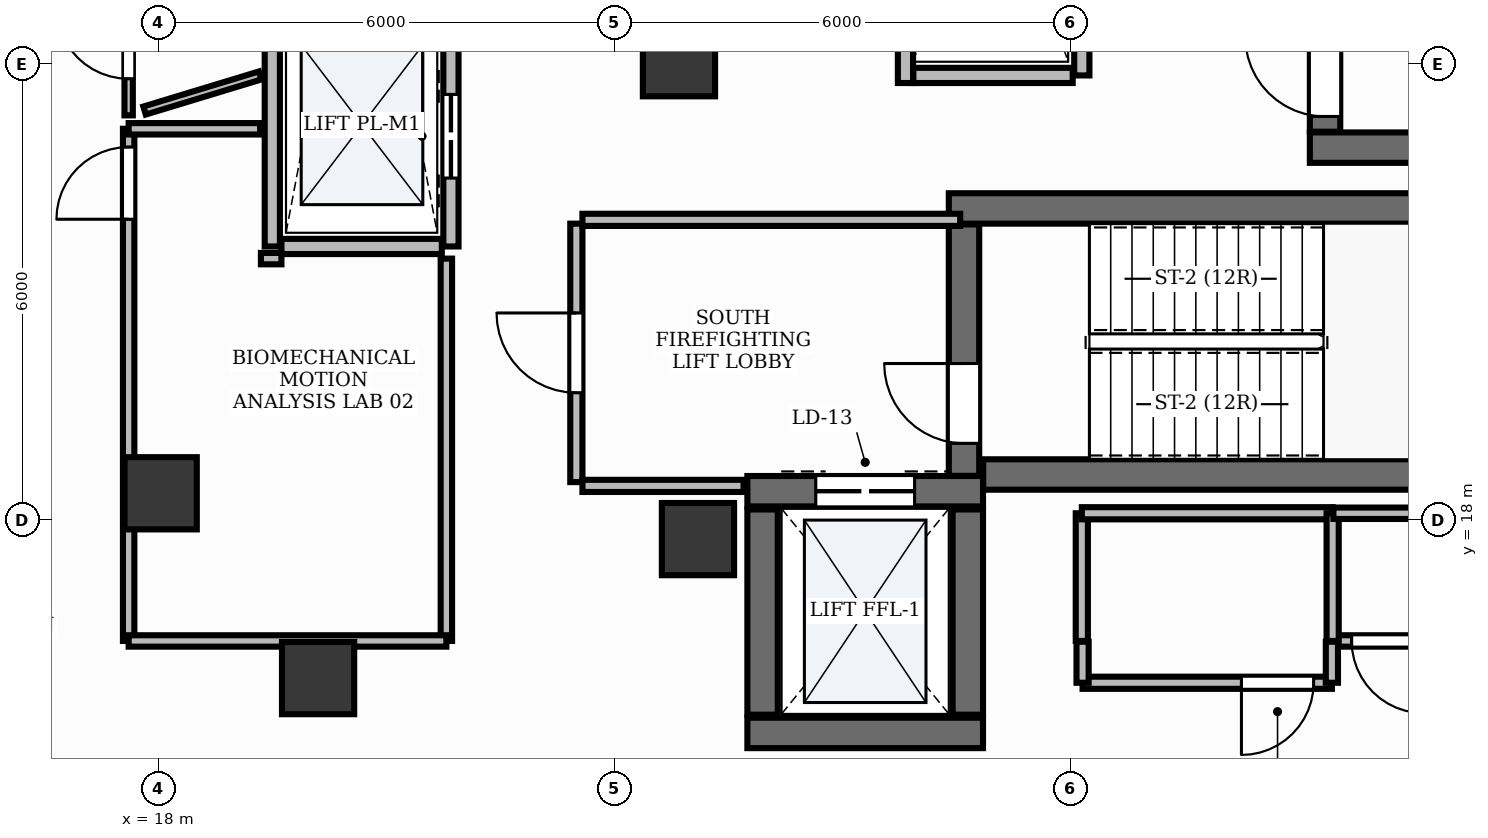
"""IFC4 building model, lengths in metres.
Left out: names, types, materials, properties, quantities, classifications, styles, units other than length and angle.
Written with IfcOpenShell. Run it as: python <this file> out.ifc"""

import sys

from ifc_helpers import new_model, si_unit, direction, frame, frame_2d, origin, origin_2d, place, context, subcontext, project, spatial, rectangle, extrude, element, fill, save


model = new_model("IFC4")
c1 = context("Model", 3, precision=1e-05, world=origin(), true_north=direction((0.0, 1.0)))
c2 = subcontext(c1, "Body", "Model", "MODEL_VIEW")
j1 = project(units=[si_unit("LENGTHUNIT", "METRE"), si_unit("PLANEANGLEUNIT", "RADIAN")], contexts=[c1])
p1 = place(None, origin())
s1 = spatial("IfcSite", under=j1, at=p1, CompositionType="ELEMENT")
p2 = place(p1, origin())
s2 = spatial("IfcBuilding", under=s1, at=p2, CompositionType="ELEMENT")
p3 = place(p2, frame((0.0, 0.0, 247.8)))
s3 = spatial("IfcBuildingStorey", under=s2, at=p3, CompositionType="ELEMENT", Elevation=247.8)
p4 = place(p3, frame((28.852, 18.6, 0.0), z_axis=(0.0, 0.0, 1.0), x_axis=(1.0, 0.0, 0.0)))
e1 = element("IfcWall", 1, at=p4, inside=s3, PredefinedType="SHEAR", context=c2, shape_type="SweptSolid", body=[
    extrude(rectangle(XDim=8.198, YDim=0.4, at=frame_2d((4.099, 0.0))), origin(), (0.0, 0.0, 1.0), 3.9),
])
p5 = place(p3, frame((28.4, 22.1, 0.0), z_axis=(0.0, 0.0, 1.0), x_axis=(1.0, 0.0, 0.0)))
e2 = element("IfcWall", 2, at=p5, inside=s3, PredefinedType="SHEAR", context=c2, shape_type="SweptSolid", body=[
    extrude(rectangle(XDim=8.65, YDim=0.4, at=frame_2d((4.325, 0.0))), origin(), (0.0, 0.0, 1.0), 3.9),
])
p6 = place(p3, frame((28.6, 18.582, 0.0), z_axis=(0.0, 0.0, 1.0), x_axis=(0.0, 1.0, 0.0)))
e3 = element("IfcWall", 3, at=p6, inside=s3, PredefinedType="SHEAR", context=c2, shape_type="SweptSolid", body=[
    extrude(rectangle(XDim=3.308, YDim=0.4, at=frame_2d((1.654, 0.0))), origin(), (0.0, 0.0, 1.0), 3.9),
])
p7 = place(p6, frame((0.428, 0.0, 0.0)))
e4 = element("IfcOpeningElement", 4, at=p7, cuts=e3, PredefinedType="OPENING", context=c2, shape_type="SweptSolid", body=[
    extrude(rectangle(XDim=1.05, YDim=2.15, at=frame_2d((0.525, 1.075))), frame((0.0, 0.215, 0.0), z_axis=(0.0, -1.0, 0.0), x_axis=(1.0, 0.0, 0.0)), (0.0, 0.0, 1.0), 0.43),
])
p8 = place(p3, frame((33.15, 22.9, 0.0), z_axis=(0.0, 0.0, 1.0), x_axis=(1.0, 0.0, 0.0)))
e5 = element("IfcWall", 5, at=p8, inside=s3, PredefinedType="SHEAR", context=c2, shape_type="SweptSolid", body=[
    extrude(rectangle(XDim=3.9, YDim=0.4, at=frame_2d((1.95, 0.0))), origin(), (0.0, 0.0, 1.0), 3.9),
])
p9 = place(p3, frame((33.35, 23.11, 0.0), z_axis=(0.0, 0.0, 1.0), x_axis=(0.0, 1.0, 0.0)))
e6 = element("IfcWall", 6, at=p9, inside=s3, PredefinedType="SHEAR", context=c2, shape_type="SweptSolid", body=[
    extrude(rectangle(XDim=7.78, YDim=0.4, at=frame_2d((3.89, 0.0))), origin(), (0.0, 0.0, 1.0), 3.9),
])
p10 = place(p9, frame((0.2, 0.0, 0.0)))
e7 = element("IfcOpeningElement", 7, at=p10, cuts=e6, PredefinedType="OPENING", context=c2, shape_type="SweptSolid", body=[
    extrude(rectangle(XDim=1.05, YDim=2.15, at=frame_2d((0.525, 1.075))), frame((0.0, 0.215, 0.0), z_axis=(0.0, -1.0, 0.0), x_axis=(1.0, 0.0, 0.0)), (0.0, 0.0, 1.0), 0.43),
])
p11 = place(p3, frame((25.75, 15.2, 0.0), z_axis=(0.0, 0.0, 1.0), x_axis=(1.0, 0.0, 0.0)))
e8 = element("IfcWall", 8, at=p11, inside=s3, PredefinedType="SHEAR", context=c2, shape_type="SweptSolid", body=[
    extrude(rectangle(XDim=3.1, YDim=0.4, at=frame_2d((1.55, 0.0))), origin(), (0.0, 0.0, 1.0), 3.9),
])
p12 = place(p3, frame((25.75, 18.38, 0.0), z_axis=(0.0, 0.0, 1.0), x_axis=(1.0, 0.0, 0.0)))
e9 = element("IfcWall", 9, at=p12, inside=s3, PredefinedType="SHEAR", context=c2, shape_type="SweptSolid", body=[
    extrude(rectangle(XDim=3.1, YDim=0.4, at=frame_2d((1.55, 0.0))), origin(), (0.0, 0.0, 1.0), 3.9),
])
p13 = place(p12, frame((0.9, 0.0, 0.0)))
e10 = element("IfcOpeningElement", 10, at=p13, cuts=e9, PredefinedType="OPENING", context=c2, shape_type="SweptSolid", body=[
    extrude(rectangle(XDim=1.3, YDim=2.2, at=frame_2d((0.65, 1.1))), frame((0.0, 0.215, 0.0), z_axis=(0.0, -1.0, 0.0), x_axis=(1.0, 0.0, 0.0)), (0.0, 0.0, 1.0), 0.43),
])
for number, where, z_axis, x_axis in (
    (11, (25.95, 15.44, 0.0), (0.0, 0.0, 1.0), (0.0, 1.0, 0.0)),
    (12, (28.65, 15.44, 0.0), (0.0, 0.0, 1.0), (0.0, 1.0, 0.0)),
):
    element("IfcWall", number, at=place(p3, frame(where, z_axis=z_axis, x_axis=x_axis)), inside=s3, PredefinedType="SHEAR", context=c2, shape_type="SweptSolid", body=[
        extrude(rectangle(XDim=2.7, YDim=0.4, at=frame_2d((1.35, 0.0))), origin(), (0.0, 0.0, 1.0), 3.9),
    ])
for number, where, z_axis, x_axis in (
    (13, (24.85, 24.05, -0.0), (0.0, 0.0, 1.0), (1.0, 0.0, 0.0)),
    (14, (25.1, 17.75, -0.0), (0.0, 0.0, 1.0), (1.0, 0.0, 0.0)),
):
    element("IfcColumn", number, at=place(p3, frame(where, z_axis=z_axis, x_axis=x_axis)), inside=s3, PredefinedType="PILASTER", context=c2, shape_type="SweptSolid", body=[
        extrude(rectangle(XDim=0.95, YDim=0.95, at=origin_2d()), origin(), (0.0, 0.0, 1.0), 3.901),
    ])
for number, where, z_axis, x_axis in (
    (15, (18.031, 18.353, -0.0), (0.0, 0.0, 1.0), (1.0, 0.0, 0.0)),
    (16, (20.102, 15.921, -0.0), (0.0, 0.0, 1.0), (1.0, 0.0, 0.0)),
):
    element("IfcColumn", number, at=place(p3, frame(where, z_axis=z_axis, x_axis=x_axis)), inside=s3, PredefinedType="COLUMN", context=c2, shape_type="SweptSolid", body=[
        extrude(rectangle(XDim=0.95, YDim=0.95, at=origin_2d()), origin(), (0.0, 0.0, 1.0), 3.901),
    ])
p14 = place(p3, frame((19.5, 21.6, 0.0), z_axis=(0.0, 0.0, 1.0), x_axis=(0.0, 1.0, 0.0)))
e17 = element("IfcWall", 17, at=p14, inside=s3, PredefinedType="PARTITIONING", context=c2, shape_type="SweptSolid", body=[
    extrude(rectangle(XDim=10.8, YDim=0.2, at=frame_2d((5.4, 0.0))), origin(), (0.0, 0.0, 1.0), 2.91),
])
p15 = place(p3, frame((21.85, 21.6, 0.0), z_axis=(0.0, 0.0, 1.0), x_axis=(0.0, 1.0, 0.0)))
e18 = element("IfcWall", 18, at=p15, inside=s3, PredefinedType="PARTITIONING", context=c2, shape_type="SweptSolid", body=[
    extrude(rectangle(XDim=10.8, YDim=0.2, at=frame_2d((5.4, 0.0))), origin(), (0.0, 0.0, 1.0), 2.91),
])
p16 = place(p15, frame((0.9, 0.0, 0.0)))
e19 = element("IfcOpeningElement", 19, at=p16, cuts=e18, PredefinedType="OPENING", context=c2, shape_type="SweptSolid", body=[
    extrude(rectangle(XDim=1.1, YDim=2.2, at=frame_2d((0.55, 1.1))), frame((0.0, 0.115, 0.0), z_axis=(0.0, -1.0, 0.0), x_axis=(1.0, 0.0, 0.0)), (0.0, 0.0, 1.0), 0.23),
])
p17 = place(p15, frame((3.6, 0.0, 0.0)))
e20 = element("IfcOpeningElement", 20, at=p17, cuts=e18, PredefinedType="OPENING", context=c2, shape_type="SweptSolid", body=[
    extrude(rectangle(XDim=1.1, YDim=2.2, at=frame_2d((0.55, 1.1))), frame((0.0, 0.115, 0.0), z_axis=(0.0, -1.0, 0.0), x_axis=(1.0, 0.0, 0.0)), (0.0, 0.0, 1.0), 0.23),
])
p18 = place(p15, frame((6.3, 0.0, 0.0)))
e21 = element("IfcOpeningElement", 21, at=p18, cuts=e18, PredefinedType="OPENING", context=c2, shape_type="SweptSolid", body=[
    extrude(rectangle(XDim=1.1, YDim=2.2, at=frame_2d((0.55, 1.1))), frame((0.0, 0.115, 0.0), z_axis=(0.0, -1.0, 0.0), x_axis=(1.0, 0.0, 0.0)), (0.0, 0.0, 1.0), 0.23),
])
p19 = place(p15, frame((9.0, 0.0, 0.0)))
e22 = element("IfcOpeningElement", 22, at=p19, cuts=e18, PredefinedType="OPENING", context=c2, shape_type="SweptSolid", body=[
    extrude(rectangle(XDim=1.1, YDim=2.2, at=frame_2d((0.55, 1.1))), frame((0.0, 0.115, 0.0), z_axis=(0.0, -1.0, 0.0), x_axis=(1.0, 0.0, 0.0)), (0.0, 0.0, 1.0), 0.23),
])
p20 = place(p3, frame((19.62, 21.6, 0.0), z_axis=(0.0, 0.0, 1.0), x_axis=(1.0, 0.0, 0.0)))
e23 = element("IfcWall", 23, at=p20, inside=s3, PredefinedType="PARTITIONING", context=c2, shape_type="SweptSolid", body=[
    extrude(rectangle(XDim=2.11, YDim=0.2, at=frame_2d((1.055, 0.0))), origin(), (0.0, 0.0, 1.0), 2.91),
])
p21 = place(p3, frame((27.83, 23.75, 0.0), z_axis=(0.0, 0.0, 1.0), x_axis=(0.0, 1.0, 0.0)))
e24 = element("IfcWall", 24, at=p21, inside=s3, PredefinedType="PARTITIONING", context=c2, shape_type="SweptSolid", body=[
    extrude(rectangle(XDim=1.366, YDim=0.2, at=frame_2d((0.683, 0.0))), origin(), (0.0, 0.0, 1.0), 2.91),
])
p22 = place(p3, frame((30.15, 23.85, 0.0), z_axis=(0.0, 0.0, 1.0), x_axis=(0.0, 1.0, 0.0)))
e25 = element("IfcWall", 25, at=p22, inside=s3, PredefinedType="PARTITIONING", context=c2, shape_type="SweptSolid", body=[
    extrude(rectangle(XDim=6.35, YDim=0.2, at=frame_2d((3.175, 0.0))), origin(), (0.0, 0.0, 1.0), 2.91),
])
p23 = place(p3, frame((27.934, 23.85, 0.0), z_axis=(0.0, 0.0, 1.0), x_axis=(1.0, 0.0, 0.0)))
e26 = element("IfcWall", 26, at=p23, inside=s3, PredefinedType="PARTITIONING", context=c2, shape_type="SweptSolid", body=[
    extrude(rectangle(XDim=2.096, YDim=0.2, at=frame_2d((1.048, 0.0))), origin(), (0.0, 0.0, 1.0), 2.91),
])
p24 = place(p3, frame((23.5, 18.5, 0.0), z_axis=(0.0, 0.0, 1.0), x_axis=(0.0, 1.0, 0.0)))
e27 = element("IfcWall", 27, at=p24, inside=s3, PredefinedType="PARTITIONING", context=c2, shape_type="SweptSolid", body=[
    extrude(rectangle(XDim=3.4, YDim=0.16, at=frame_2d((1.7, 0.0))), origin(), (0.0, 0.0, 1.0), 2.91),
])
p25 = place(p24, frame((1.175, 0.0, 0.0)))
e28 = element("IfcOpeningElement", 28, at=p25, cuts=e27, PredefinedType="OPENING", context=c2, shape_type="SweptSolid", body=[
    extrude(rectangle(XDim=1.05, YDim=2.15, at=frame_2d((0.525, 1.075))), frame((0.0, 0.095, 0.0), z_axis=(0.0, -1.0, 0.0), x_axis=(1.0, 0.0, 0.0)), (0.0, 0.0, 1.0), 0.19),
])
p26 = place(p3, frame((23.58, 21.95, 0.0), z_axis=(0.0, 0.0, 1.0), x_axis=(1.0, 0.0, 0.0)))
e29 = element("IfcWall", 29, at=p26, inside=s3, PredefinedType="PARTITIONING", context=c2, shape_type="SweptSolid", body=[
    extrude(rectangle(XDim=4.97, YDim=0.16, at=frame_2d((2.485, 0.0))), origin(), (0.0, 0.0, 1.0), 2.91),
])
p27 = place(p3, frame((23.58, 18.45, 0.0), z_axis=(0.0, 0.0, 1.0), x_axis=(1.0, 0.0, 0.0)))
e30 = element("IfcWall", 30, at=p27, inside=s3, PredefinedType="PARTITIONING", context=c2, shape_type="SweptSolid", body=[
    extrude(rectangle(XDim=2.12, YDim=0.16, at=frame_2d((1.06, 0.0))), origin(), (0.0, 0.0, 1.0), 2.91),
])
p28 = place(p3, frame((33.44, 15.86, 0.0), z_axis=(0.0, 0.0, 1.0), x_axis=(-1.0, 0.0, 0.0)))
e31 = element("IfcWall", 31, at=p28, inside=s3, PredefinedType="PARTITIONING", context=c2, shape_type="SweptSolid", body=[
    extrude(rectangle(XDim=3.28, YDim=0.16, at=frame_2d((1.64, 0.0))), origin(), (0.0, 0.0, 1.0), 2.91),
])
p29 = place(p28, frame((0.24, 0.0, 0.0)))
e32 = element("IfcOpeningElement", 32, at=p29, cuts=e31, PredefinedType="OPENING", context=c2, shape_type="SweptSolid", body=[
    extrude(rectangle(XDim=0.95, YDim=2.15, at=frame_2d((0.475, 1.075))), frame((0.0, 0.095, 0.0), z_axis=(0.0, -1.0, 0.0), x_axis=(1.0, 0.0, 0.0)), (0.0, 0.0, 1.0), 0.19),
])
p30 = place(p3, frame((17.61, 16.41, 0.0), z_axis=(0.0, 0.0, 1.0), x_axis=(0.0, 1.0, 0.0)))
e33 = element("IfcWall", 33, at=p30, inside=s3, PredefinedType="PARTITIONING", context=c2, shape_type="SweptSolid", body=[
    extrude(rectangle(XDim=6.738, YDim=0.15, at=frame_2d((3.369, 0.0))), origin(), (0.0, 0.0, 1.0), 2.91),
])
p31 = place(p30, frame((5.548, 0.0, 0.0)))
e34 = element("IfcOpeningElement", 34, at=p31, cuts=e33, PredefinedType="OPENING", context=c2, shape_type="SweptSolid", body=[
    extrude(rectangle(XDim=0.95, YDim=2.15, at=frame_2d((0.475, 1.075))), frame((0.0, 0.09, 0.0), z_axis=(0.0, -1.0, 0.0), x_axis=(1.0, 0.0, 0.0)), (0.0, 0.0, 1.0), 0.18),
])
p32 = place(p3, frame((44.5, 16.41, 0.0), z_axis=(0.0, 0.0, 1.0), x_axis=(-1.0, 0.0, 0.0)))
e35 = element("IfcWall", 35, at=p32, inside=s3, PredefinedType="PARTITIONING", context=c2, shape_type="SweptSolid", body=[
    extrude(rectangle(XDim=11.04, YDim=0.15, at=frame_2d((5.52, 0.0))), origin(), (0.0, 0.0, 1.0), 2.91),
])
p33 = place(p32, frame((9.85, 0.0, 0.0)))
e36 = element("IfcOpeningElement", 36, at=p33, cuts=e35, PredefinedType="OPENING", context=c2, shape_type="SweptSolid", body=[
    extrude(rectangle(XDim=0.95, YDim=2.15, at=frame_2d((0.475, 1.075))), frame((0.0, 0.09, 0.0), z_axis=(0.0, -1.0, 0.0), x_axis=(1.0, 0.0, 0.0)), (0.0, 0.0, 1.0), 0.18),
])
p34 = place(p3, frame((17.61, 23.324, 0.0), z_axis=(0.0, 0.0, 1.0), x_axis=(0.0, 1.0, 0.0)))
e37 = element("IfcWall", 37, at=p34, inside=s3, PredefinedType="MOVABLE", context=c2, shape_type="SweptSolid", body=[
    extrude(rectangle(XDim=8.466, YDim=0.11, at=frame_2d((4.233, 0.0))), origin(), (0.0, 0.0, 1.0), 2.91),
])
p35 = place(p34, frame((0.481, 0.0, 0.0)))
e38 = element("IfcOpeningElement", 38, at=p35, cuts=e37, PredefinedType="OPENING", context=c2, shape_type="SweptSolid", body=[
    extrude(rectangle(XDim=0.95, YDim=2.15, at=frame_2d((0.475, 1.075))), frame((0.0, 0.07, 0.0), z_axis=(0.0, -1.0, 0.0), x_axis=(1.0, 0.0, 0.0)), (0.0, 0.0, 1.0), 0.14),
])
for number, where, z_axis, x_axis in (
    (39, (33.44, 16.4, 0.0), (0.0, 0.0, 1.0), (0.0, -1.0, 0.0)),
    (40, (30.16, 15.86, 0.0), (0.0, 0.0, 1.0), (0.0, 1.0, 0.0)),
):
    element("IfcWall", number, at=place(p3, frame(where, z_axis=z_axis, x_axis=x_axis)), inside=s3, PredefinedType="PARTITIONING", context=c2, shape_type="SweptSolid", body=[
        extrude(rectangle(XDim=0.54, YDim=0.16, at=frame_2d((0.27, 0.0))), origin(), (0.0, 0.0, 1.0), 2.91),
    ])
p36 = place(p3, frame((30.15, 16.41, 0.0), z_axis=(0.0, 0.0, 1.0), x_axis=(0.0, 1.0, 0.0)))
e41 = element("IfcWall", 41, at=p36, inside=s3, PredefinedType="PARTITIONING", context=c2, shape_type="SweptSolid", body=[
    extrude(rectangle(XDim=1.68, YDim=0.16, at=frame_2d((0.84, 0.0))), origin(), (0.0, 0.0, 1.0), 2.91),
])
p37 = place(p3, frame((30.15, 18.09, 0.0), z_axis=(0.0, 0.0, 1.0), x_axis=(1.0, 0.0, 0.0)))
e42 = element("IfcWall", 42, at=p37, inside=s3, PredefinedType="PARTITIONING", context=c2, shape_type="SweptSolid", body=[
    extrude(rectangle(XDim=3.3, YDim=0.16, at=frame_2d((1.65, 0.0))), origin(), (0.0, 0.0, 1.0), 2.91),
])
p38 = place(p3, frame((33.45, 18.09, 0.0), z_axis=(0.0, 0.0, 1.0), x_axis=(0.0, -1.0, 0.0)))
e43 = element("IfcWall", 43, at=p38, inside=s3, PredefinedType="PARTITIONING", context=c2, shape_type="SweptSolid", body=[
    extrude(rectangle(XDim=1.68, YDim=0.16, at=frame_2d((0.84, 0.0))), origin(), (0.0, 0.0, 1.0), 2.91),
])
p39 = place(p3, frame((19.35, 21.44, 0.0), z_axis=(0.0, 0.0, 1.0), x_axis=(1.0, 0.0, 0.0)))
e44 = element("IfcWall", 44, at=p39, inside=s3, PredefinedType="PARTITIONING", context=c2, shape_type="SweptSolid", body=[
    extrude(rectangle(XDim=0.27, YDim=0.15, at=frame_2d((0.135, 0.0))), origin(), (0.0, 0.0, 1.0), 2.91),
])
p40 = place(p3, frame((21.79, 21.44, 0.0), z_axis=(0.0, 0.0, 1.0), x_axis=(0.0, -1.0, 0.0)))
e45 = element("IfcWall", 45, at=p40, inside=s3, PredefinedType="PARTITIONING", context=c2, shape_type="SweptSolid", body=[
    extrude(rectangle(XDim=5.03, YDim=0.15, at=frame_2d((2.515, 0.0))), origin(), (0.0, 0.0, 1.0), 2.91),
])
p41 = place(p3, frame((21.79, 16.41, 0.0), z_axis=(0.0, 0.0, 1.0), x_axis=(-1.0, 0.0, 0.0)))
e46 = element("IfcWall", 46, at=p41, inside=s3, PredefinedType="PARTITIONING", context=c2, shape_type="SweptSolid", body=[
    extrude(rectangle(XDim=4.18, YDim=0.15, at=frame_2d((2.09, 0.0))), origin(), (0.0, 0.0, 1.0), 2.91),
])
p42 = place(p3, frame((17.61, 23.148, 0.0), z_axis=(0.0, 0.0, 1.0), x_axis=(1.0, 0.0, 0.0)))
e47 = element("IfcWall", 47, at=p42, inside=s3, PredefinedType="PARTITIONING", context=c2, shape_type="SweptSolid", body=[
    extrude(rectangle(XDim=1.73, YDim=0.15, at=frame_2d((0.865, 0.0))), origin(), (0.0, 0.0, 1.0), 2.91),
])
p43 = place(p3, frame((33.46, 18.09, 0.0), z_axis=(0.0, 0.0, 1.0), x_axis=(1.0, 0.0, 0.0)))
e48 = element("IfcWall", 48, at=p43, inside=s3, PredefinedType="PARTITIONING", context=c2, shape_type="SweptSolid", body=[
    extrude(rectangle(XDim=3.89, YDim=0.15, at=frame_2d((1.945, 0.0))), origin(), (0.0, 0.0, 1.0), 2.91),
])
p44 = place(p3, frame((19.34, 23.85, 0.0), z_axis=(0.0, 0.0, 1.0), x_axis=(-0.956878289182, -0.290489138681, 0.0)))
e49 = element("IfcWall", 49, at=p44, inside=s3, PredefinedType="MOVABLE", context=c2, shape_type="SweptSolid", body=[
    extrude(rectangle(XDim=1.589, YDim=0.11, at=frame_2d((0.795, 0.0))), origin(), (0.0, 0.0, 1.0), 2.91),
])
p45 = place(p7, origin())
e50 = element("IfcDoor", 50, at=p45, inside=s3, OperationType="SINGLE_SWING_RIGHT", PredefinedType="DOOR", context=c2, shape_type="SweptSolid", body=[
    extrude(rectangle(XDim=1.05, YDim=2.15, at=frame_2d((0.525, 1.075))), frame((0.0, 0.025, 0.0), z_axis=(0.0, -1.0, 0.0), x_axis=(1.0, 0.0, 0.0)), (0.0, 0.0, 1.0), 0.05),
])
fill(e4, e50)
p46 = place(p10, origin())
e51 = element("IfcDoor", 51, at=p46, inside=s3, OperationType="SINGLE_SWING_RIGHT", PredefinedType="DOOR", context=c2, shape_type="SweptSolid", body=[
    extrude(rectangle(XDim=1.05, YDim=2.15, at=frame_2d((0.525, 1.075))), frame((0.0, 0.025, 0.0), z_axis=(0.0, -1.0, 0.0), x_axis=(1.0, 0.0, 0.0)), (0.0, 0.0, 1.0), 0.05),
])
fill(e7, e51)
p47 = place(p16, origin())
e52 = element("IfcDoor", 52, at=p47, inside=s3, OperationType="DOUBLE_DOOR_SLIDING", PredefinedType="DOOR", context=c2, shape_type="SweptSolid", body=[
    extrude(rectangle(XDim=1.1, YDim=2.2, at=frame_2d((0.55, 1.1))), frame((0.0, 0.025, 0.0), z_axis=(0.0, -1.0, 0.0), x_axis=(1.0, 0.0, 0.0)), (0.0, 0.0, 1.0), 0.05),
])
fill(e19, e52)
p48 = place(p13, origin())
e53 = element("IfcDoor", 53, at=p48, inside=s3, OperationType="DOUBLE_DOOR_SLIDING", PredefinedType="DOOR", context=c2, shape_type="SweptSolid", body=[
    extrude(rectangle(XDim=1.3, YDim=2.2, at=frame_2d((0.65, 1.1))), frame((0.0, 0.025, 0.0), z_axis=(0.0, -1.0, 0.0), x_axis=(1.0, 0.0, 0.0)), (0.0, 0.0, 1.0), 0.05),
])
fill(e10, e53)
p49 = place(p25, origin())
e54 = element("IfcDoor", 54, at=p49, inside=s3, OperationType="SINGLE_SWING_RIGHT", PredefinedType="DOOR", context=c2, shape_type="SweptSolid", body=[
    extrude(rectangle(XDim=1.05, YDim=2.15, at=frame_2d((0.525, 1.075))), frame((0.0, 0.025, 0.0), z_axis=(0.0, -1.0, 0.0), x_axis=(1.0, 0.0, 0.0)), (0.0, 0.0, 1.0), 0.05),
])
fill(e28, e54)
p50 = place(p29, origin())
e55 = element("IfcDoor", 55, at=p50, inside=s3, OperationType="SINGLE_SWING_RIGHT", PredefinedType="DOOR", context=c2, shape_type="SweptSolid", body=[
    extrude(rectangle(XDim=0.95, YDim=2.15, at=frame_2d((0.475, 1.075))), frame((0.0, 0.025, 0.0), z_axis=(0.0, -1.0, 0.0), x_axis=(1.0, 0.0, 0.0)), (0.0, 0.0, 1.0), 0.05),
])
fill(e32, e55)
p51 = place(p31, origin())
e56 = element("IfcDoor", 56, at=p51, inside=s3, OperationType="SINGLE_SWING_LEFT", PredefinedType="DOOR", context=c2, shape_type="SweptSolid", body=[
    extrude(rectangle(XDim=0.95, YDim=2.15, at=frame_2d((0.475, 1.075))), frame((0.0, 0.025, 0.0), z_axis=(0.0, -1.0, 0.0), x_axis=(1.0, 0.0, 0.0)), (0.0, 0.0, 1.0), 0.05),
])
fill(e34, e56)
p52 = place(p33, origin())
e57 = element("IfcDoor", 57, at=p52, inside=s3, OperationType="SINGLE_SWING_LEFT", PredefinedType="DOOR", context=c2, shape_type="SweptSolid", body=[
    extrude(rectangle(XDim=0.95, YDim=2.15, at=frame_2d((0.475, 1.075))), frame((0.0, 0.025, 0.0), z_axis=(0.0, -1.0, 0.0), x_axis=(1.0, 0.0, 0.0)), (0.0, 0.0, 1.0), 0.05),
])
fill(e36, e57)
p53 = place(p35, origin())
e58 = element("IfcDoor", 58, at=p53, inside=s3, OperationType="SINGLE_SWING_RIGHT", PredefinedType="DOOR", context=c2, shape_type="SweptSolid", body=[
    extrude(rectangle(XDim=0.95, YDim=2.15, at=frame_2d((0.475, 1.075))), frame((0.0, 0.025, 0.0), z_axis=(0.0, -1.0, 0.0), x_axis=(1.0, 0.0, 0.0)), (0.0, 0.0, 1.0), 0.05),
])
fill(e38, e58)
save(model, sys.argv[1])
